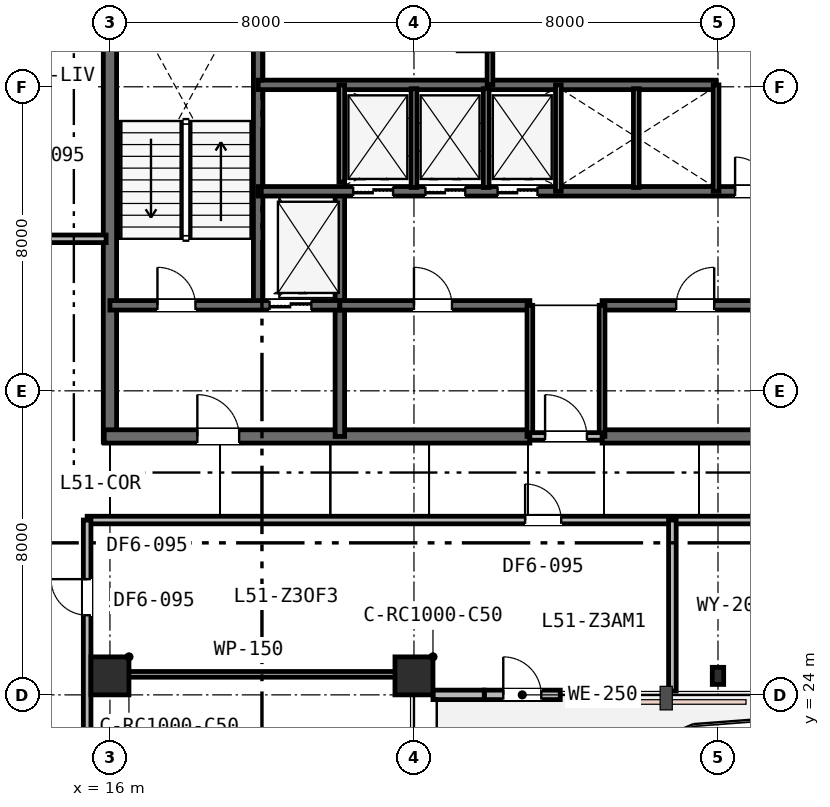
"""IFC4 building model, lengths in metres.
Left out: names, types, materials, properties, quantities, classifications, styles, units other than length and angle.
Written with IfcOpenShell. Run it as: python <this file> out.ifc"""

import sys

from ifc_helpers import new_model, si_unit, direction, frame, frame_2d, origin, origin_2d, place, context, subcontext, project, spatial, rectangle, i_section, extrude, element, fill, save


model = new_model("IFC4")
c1 = context("Model", 3, precision=1e-05, world=origin(), true_north=direction((0.0, 1.0)))
c2 = subcontext(c1, "Body", "Model", "MODEL_VIEW")
j1 = project(units=[si_unit("LENGTHUNIT", "METRE"), si_unit("PLANEANGLEUNIT", "RADIAN")], contexts=[c1])
p1 = place(None, origin())
s1 = spatial("IfcSite", under=j1, at=p1, CompositionType="ELEMENT")
p2 = place(p1, origin())
s2 = spatial("IfcBuilding", under=s1, at=p2, CompositionType="ELEMENT")
p3 = place(p2, frame((0.0, 0.0, 197.4)))
s3 = spatial("IfcBuildingStorey", under=s2, at=p3, CompositionType="ELEMENT", Elevation=197.4)
p4 = place(p3, frame((16.0, 30.65, 0.0), z_axis=(0.0, 0.0, 1.0), x_axis=(0.0, 1.0, 0.0)))
e1 = element("IfcWall", 1, at=p4, inside=s3, PredefinedType="SHEAR", context=c2, shape_type="SweptSolid", body=[
    extrude(rectangle(XDim=12.3, YDim=0.35, at=frame_2d((6.15, 0.0))), origin(), (0.0, 0.0, 1.0), 3.6),
])
p5 = place(p3, frame((15.85, 30.8, 0.0), z_axis=(0.0, 0.0, 1.0), x_axis=(1.0, 0.0, 0.0)))
e2 = element("IfcWall", 2, at=p5, inside=s3, PredefinedType="SHEAR", context=c2, shape_type="SweptSolid", body=[
    extrude(rectangle(XDim=11.2, YDim=0.35, at=frame_2d((5.6, 0.0))), origin(), (0.0, 0.0, 1.0), 3.6),
])
p6 = place(p5, frame((2.45, 0.0, 0.0)))
e3 = element("IfcOpeningElement", 3, at=p6, cuts=e2, PredefinedType="OPENING", context=c2, shape_type="SweptSolid", body=[
    extrude(rectangle(XDim=1.1, YDim=2.15, at=frame_2d((0.55, 1.075))), frame((0.0, 0.185, 0.0), z_axis=(0.0, -1.0, 0.0), x_axis=(1.0, 0.0, 0.0)), (0.0, 0.0, 1.0), 0.37),
])
p7 = place(p3, frame((28.95, 30.8, 0.0), z_axis=(0.0, 0.0, 1.0), x_axis=(1.0, 0.0, 0.0)))
e4 = element("IfcWall", 4, at=p7, inside=s3, PredefinedType="SHEAR", context=c2, shape_type="SweptSolid", body=[
    extrude(rectangle(XDim=11.2, YDim=0.35, at=frame_2d((5.6, 0.0))), origin(), (0.0, 0.0, 1.0), 3.6),
])
p8 = place(p7, frame((7.65, 0.0, 0.0)))
e5 = element("IfcOpeningElement", 5, at=p8, cuts=e4, PredefinedType="OPENING", context=c2, shape_type="SweptSolid", body=[
    extrude(rectangle(XDim=1.1, YDim=2.15, at=frame_2d((0.55, 1.075))), frame((0.0, 0.185, 0.0), z_axis=(0.0, -1.0, 0.0), x_axis=(1.0, 0.0, 0.0)), (0.0, 0.0, 1.0), 0.37),
])
p9 = place(p3, frame((19.9, 34.25, 0.0), z_axis=(0.0, 0.0, 1.0), x_axis=(0.0, 1.0, 0.0)))
e6 = element("IfcWall", 6, at=p9, inside=s3, PredefinedType="SHEAR", context=c2, shape_type="SweptSolid", body=[
    extrude(rectangle(XDim=8.65, YDim=0.25, at=frame_2d((4.325, 0.0))), origin(), (0.0, 0.0, 1.0), 3.6),
])
p10 = place(p3, frame((22.05, 30.8, 0.0), z_axis=(0.0, 0.0, 1.0), x_axis=(0.0, 1.0, 0.0)))
e7 = element("IfcWall", 7, at=p10, inside=s3, PredefinedType="SHEAR", context=c2, shape_type="SweptSolid", body=[
    extrude(rectangle(XDim=6.45, YDim=0.25, at=frame_2d((3.225, 0.0))), origin(), (0.0, 0.0, 1.0), 3.6),
])
p11 = place(p3, frame((16.0, 34.25, 0.0), z_axis=(0.0, 0.0, 1.0), x_axis=(1.0, 0.0, 0.0)))
e8 = element("IfcWall", 8, at=p11, inside=s3, PredefinedType="SHEAR", context=c2, shape_type="SweptSolid", body=[
    extrude(rectangle(XDim=6.05, YDim=0.25, at=frame_2d((3.025, 0.0))), origin(), (0.0, 0.0, 1.0), 3.6),
])
p12 = place(p11, frame((1.25, 0.0, 0.0)))
e9 = element("IfcOpeningElement", 9, at=p12, cuts=e8, PredefinedType="OPENING", context=c2, shape_type="SweptSolid", body=[
    extrude(rectangle(XDim=1.0, YDim=2.15, at=frame_2d((0.5, 1.075))), frame((0.0, 0.135, 0.0), z_axis=(0.0, -1.0, 0.0), x_axis=(1.0, 0.0, 0.0)), (0.0, 0.0, 1.0), 0.27),
])
p13 = place(p11, frame((4.2, 0.0, 0.0)))
e10 = element("IfcOpeningElement", 10, at=p13, cuts=e8, PredefinedType="OPENING", context=c2, shape_type="SweptSolid", body=[
    extrude(rectangle(XDim=1.1, YDim=2.15, at=frame_2d((0.55, 1.075))), frame((0.0, 0.135, 0.0), z_axis=(0.0, -1.0, 0.0), x_axis=(1.0, 0.0, 0.0)), (0.0, 0.0, 1.0), 0.27),
])
p14 = place(p3, frame((22.05, 34.25, 0.0), z_axis=(0.0, 0.0, 1.0), x_axis=(1.0, 0.0, 0.0)))
e11 = element("IfcWall", 11, at=p14, inside=s3, PredefinedType="SHEAR", context=c2, shape_type="SweptSolid", body=[
    extrude(rectangle(XDim=5.0, YDim=0.25, at=frame_2d((2.5, 0.0))), origin(), (0.0, 0.0, 1.0), 3.6),
])
p15 = place(p14, frame((1.95, 0.0, 0.0)))
e12 = element("IfcOpeningElement", 12, at=p15, cuts=e11, PredefinedType="OPENING", context=c2, shape_type="SweptSolid", body=[
    extrude(rectangle(XDim=1.0, YDim=2.15, at=frame_2d((0.5, 1.075))), frame((0.0, 0.135, 0.0), z_axis=(0.0, -1.0, 0.0), x_axis=(1.0, 0.0, 0.0)), (0.0, 0.0, 1.0), 0.27),
])
p16 = place(p3, frame((28.95, 34.25, 0.0), z_axis=(0.0, 0.0, 1.0), x_axis=(1.0, 0.0, 0.0)))
e13 = element("IfcWall", 13, at=p16, inside=s3, PredefinedType="SHEAR", context=c2, shape_type="SweptSolid", body=[
    extrude(rectangle(XDim=5.0, YDim=0.25, at=frame_2d((2.5, 0.0))), origin(), (0.0, 0.0, 1.0), 3.6),
])
p17 = place(p16, frame((1.95, 0.0, 0.0)))
e14 = element("IfcOpeningElement", 14, at=p17, cuts=e13, PredefinedType="OPENING", context=c2, shape_type="SweptSolid", body=[
    extrude(rectangle(XDim=1.0, YDim=2.15, at=frame_2d((0.5, 1.075))), frame((0.0, 0.135, 0.0), z_axis=(0.0, -1.0, 0.0), x_axis=(1.0, 0.0, 0.0)), (0.0, 0.0, 1.0), 0.27),
])
p18 = place(p3, frame((19.9, 37.25, 0.0), z_axis=(0.0, 0.0, 1.0), x_axis=(1.0, 0.0, 0.0)))
e15 = element("IfcWall", 15, at=p18, inside=s3, PredefinedType="SHEAR", context=c2, shape_type="SweptSolid", body=[
    extrude(rectangle(XDim=16.2, YDim=0.25, at=frame_2d((8.1, 0.0))), origin(), (0.0, 0.0, 1.0), 3.6),
])
p19 = place(p18, frame((12.55, 0.0, 0.0)))
e16 = element("IfcOpeningElement", 16, at=p19, cuts=e15, PredefinedType="OPENING", context=c2, shape_type="SweptSolid", body=[
    extrude(rectangle(XDim=0.9, YDim=2.15, at=frame_2d((0.45, 1.075))), frame((0.0, 0.135, 0.0), z_axis=(0.0, -1.0, 0.0), x_axis=(1.0, 0.0, 0.0)), (0.0, 0.0, 1.0), 0.27),
])
p20 = place(p18, frame((2.5, 0.0, 0.0)))
e17 = element("IfcOpeningElement", 17, at=p20, cuts=e15, PredefinedType="OPENING", context=c2, shape_type="SweptSolid", body=[
    extrude(rectangle(XDim=1.05, YDim=2.15, at=frame_2d((0.525, 1.075))), frame((0.0, 0.135, 0.0), z_axis=(0.0, -1.0, 0.0), x_axis=(1.0, 0.0, 0.0)), (0.0, 0.0, 1.0), 0.27),
])
p21 = place(p18, frame((4.4, 0.0, 0.0)))
e18 = element("IfcOpeningElement", 18, at=p21, cuts=e15, PredefinedType="OPENING", context=c2, shape_type="SweptSolid", body=[
    extrude(rectangle(XDim=1.05, YDim=2.15, at=frame_2d((0.525, 1.075))), frame((0.0, 0.135, 0.0), z_axis=(0.0, -1.0, 0.0), x_axis=(1.0, 0.0, 0.0)), (0.0, 0.0, 1.0), 0.27),
])
p22 = place(p18, frame((6.3, 0.0, 0.0)))
e19 = element("IfcOpeningElement", 19, at=p22, cuts=e15, PredefinedType="OPENING", context=c2, shape_type="SweptSolid", body=[
    extrude(rectangle(XDim=1.05, YDim=2.15, at=frame_2d((0.525, 1.075))), frame((0.0, 0.135, 0.0), z_axis=(0.0, -1.0, 0.0), x_axis=(1.0, 0.0, 0.0)), (0.0, 0.0, 1.0), 0.27),
])
p23 = place(p3, frame((19.9, 40.05, 0.0), z_axis=(0.0, 0.0, 1.0), x_axis=(1.0, 0.0, 0.0)))
e20 = element("IfcWall", 20, at=p23, inside=s3, PredefinedType="SHEAR", context=c2, shape_type="SweptSolid", body=[
    extrude(rectangle(XDim=12.05, YDim=0.25, at=frame_2d((6.025, 0.0))), origin(), (0.0, 0.0, 1.0), 3.6),
])
for number, where, z_axis, x_axis in (
    (21, (16.0, 24.5, 0.0), (0.0, 0.0, 1.0), (1.0, 0.0, 0.0)),
    (22, (24.0, 24.5, 0.0), (0.0, 0.0, 1.0), (1.0, 0.0, 0.0)),
):
    element("IfcColumn", number, at=place(p3, frame(where, z_axis=z_axis, x_axis=x_axis)), inside=s3, PredefinedType="COLUMN", context=c2, shape_type="SweptSolid", body=[
        extrude(rectangle(XDim=1.0, YDim=1.0, at=origin_2d()), origin(), (0.0, 0.0, 1.0), 3.6),
    ])
p24 = place(p3, frame((32.0, 24.5, 0.0), z_axis=(0.0, 0.0, 1.0), x_axis=(1.0, 0.0, 0.0)))
e23 = element("IfcColumn", 23, at=p24, inside=s3, PredefinedType="COLUMN", context=c2, shape_type="SweptSolid", body=[
    extrude(i_section(OverallWidth=0.3, OverallDepth=0.45, WebThickness=0.014, FlangeThickness=0.026, FilletRadius=0.027, at=origin_2d()), origin(), (0.0, 0.0, 1.0), 3.6),
])
p25 = place(p3, frame((25.85, 24.0, 0.0), z_axis=(0.0, 0.0, 1.0), x_axis=(1.0, 0.0, 0.0)))
e24 = element("IfcWall", 24, at=p25, inside=s3, PredefinedType="STANDARD", context=c2, shape_type="SweptSolid", body=[
    extrude(rectangle(XDim=2.0, YDim=0.25, at=frame_2d((1.0, 0.0))), origin(), (0.0, 0.0, 1.0), 3.02),
])
p26 = place(p25, frame((0.5, 0.0, 0.0)))
e25 = element("IfcOpeningElement", 25, at=p26, cuts=e24, PredefinedType="OPENING", context=c2, shape_type="SweptSolid", body=[
    extrude(rectangle(XDim=1.0, YDim=2.15, at=frame_2d((0.5, 1.075))), frame((0.0, 0.135, 0.0), z_axis=(0.0, -1.0, 0.0), x_axis=(1.0, 0.0, 0.0)), (0.0, 0.0, 1.0), 0.27),
])
p27 = place(p3, frame((24.5, 24.0, 0.0), z_axis=(0.0, 0.0, 1.0), x_axis=(1.0, 0.0, 0.0)))
e26 = element("IfcWall", 26, at=p27, inside=s3, PredefinedType="STANDARD", context=c2, shape_type="SweptSolid", body=[
    extrude(rectangle(XDim=1.35, YDim=0.25, at=frame_2d((0.675, 0.0))), origin(), (0.0, 0.0, 1.0), 3.02),
])
for number, where, z_axis, x_axis in (
    (27, (27.05, 30.8, 0.0), (0.0, 0.0, 1.0), (0.0, 1.0, 0.0)),
    (28, (28.95, 30.8, 0.0), (0.0, 0.0, 1.0), (0.0, 1.0, 0.0)),
):
    element("IfcWall", number, at=place(p3, frame(where, z_axis=z_axis, x_axis=x_axis)), inside=s3, PredefinedType="PLUMBINGWALL", context=c2, shape_type="SweptSolid", body=[
        extrude(rectangle(XDim=3.45, YDim=0.15, at=frame_2d((1.725, 0.0))), origin(), (0.0, 0.0, 1.0), 3.07),
    ])
p28 = place(p3, frame((27.05, 30.8, 0.0), z_axis=(0.0, 0.0, 1.0), x_axis=(1.0, 0.0, 0.0)))
e29 = element("IfcWall", 29, at=p28, inside=s3, PredefinedType="PARTITIONING", context=c2, shape_type="SweptSolid", body=[
    extrude(rectangle(XDim=1.9, YDim=0.2, at=frame_2d((0.95, 0.0))), origin(), (0.0, 0.0, 1.0), 3.07),
])
p29 = place(p28, frame((0.4, 0.0, 0.0)))
e30 = element("IfcOpeningElement", 30, at=p29, cuts=e29, PredefinedType="OPENING", context=c2, shape_type="SweptSolid", body=[
    extrude(rectangle(XDim=1.1, YDim=2.15, at=frame_2d((0.55, 1.075))), frame((0.0, 0.11, 0.0), z_axis=(0.0, -1.0, 0.0), x_axis=(1.0, 0.0, 0.0)), (0.0, 0.0, 1.0), 0.22),
])
p30 = place(p3, frame((22.1, 37.49, 0.0), z_axis=(0.0, 0.0, 1.0), x_axis=(0.0, 1.0, 0.0)))
e31 = element("IfcWall", 31, at=p30, inside=s3, PredefinedType="PLUMBINGWALL", context=c2, shape_type="SweptSolid", body=[
    extrude(rectangle(XDim=2.56, YDim=0.15, at=frame_2d((1.28, 0.0))), origin(), (0.0, 0.0, 1.0), 3.33),
])
p31 = place(p3, frame((27.8, 37.25, 0.0), z_axis=(0.0, 0.0, 1.0), x_axis=(0.0, 1.0, 0.0)))
e32 = element("IfcWall", 32, at=p31, inside=s3, PredefinedType="PLUMBINGWALL", context=c2, shape_type="SweptSolid", body=[
    extrude(rectangle(XDim=2.8, YDim=0.15, at=frame_2d((1.4, 0.0))), origin(), (0.0, 0.0, 1.0), 3.33),
])
for number, where, z_axis, x_axis in (
    (33, (24.0, 37.35, 0.0), (0.0, 0.0, 1.0), (0.0, 1.0, 0.0)),
    (34, (25.9, 37.35, 0.0), (0.0, 0.0, 1.0), (0.0, 1.0, 0.0)),
):
    element("IfcWall", number, at=place(p3, frame(where, z_axis=z_axis, x_axis=x_axis)), inside=s3, PredefinedType="PLUMBINGWALL", context=c2, shape_type="SweptSolid", body=[
        extrude(rectangle(XDim=2.6, YDim=0.15, at=frame_2d((1.3, 0.0))), origin(), (0.0, 0.0, 1.0), 3.33),
    ])
p32 = place(p3, frame((31.95, 37.25, 0.0), z_axis=(0.0, 0.0, 1.0), x_axis=(0.0, 1.0, 0.0)))
e35 = element("IfcWall", 35, at=p32, inside=s3, PredefinedType="PLUMBINGWALL", context=c2, shape_type="SweptSolid", body=[
    extrude(rectangle(XDim=2.8, YDim=0.15, at=frame_2d((1.4, 0.0))), origin(), (0.0, 0.0, 1.0), 3.33),
])
p33 = place(p3, frame((29.85, 37.35, 0.0), z_axis=(0.0, 0.0, 1.0), x_axis=(0.0, 1.0, 0.0)))
e36 = element("IfcWall", 36, at=p33, inside=s3, PredefinedType="PLUMBINGWALL", context=c2, shape_type="SweptSolid", body=[
    extrude(rectangle(XDim=2.6, YDim=0.15, at=frame_2d((1.3, 0.0))), origin(), (0.0, 0.0, 1.0), 3.33),
])
p34 = place(p3, frame((26.0, 40.05, 0.0), z_axis=(0.0, 0.0, 1.0), x_axis=(0.0, 1.0, 0.0)))
e37 = element("IfcWall", 37, at=p34, inside=s3, PredefinedType="PARTITIONING", context=c2, shape_type="SweptSolid", body=[
    extrude(rectangle(XDim=2.85, YDim=0.15, at=frame_2d((1.425, 0.0))), origin(), (0.0, 0.0, 1.0), 3.33),
])
p35 = place(p34, frame((0.865, 0.0, 0.0)))
e38 = element("IfcOpeningElement", 38, at=p35, cuts=e37, PredefinedType="OPENING", context=c2, shape_type="SweptSolid", body=[
    extrude(rectangle(XDim=0.9, YDim=2.15, at=frame_2d((0.45, 1.075))), frame((0.0, 0.085, 0.0), z_axis=(0.0, -1.0, 0.0), x_axis=(1.0, 0.0, 0.0)), (0.0, 0.0, 1.0), 0.17),
])
p36 = place(p3, frame((15.4, 28.6, 0.0), z_axis=(0.0, 0.0, 1.0), x_axis=(1.0, 0.0, 0.0)))
e39 = element("IfcWall", 39, at=p36, inside=s3, PredefinedType="PARTITIONING", context=c2, shape_type="SweptSolid", body=[
    extrude(rectangle(XDim=35.5, YDim=0.2, at=frame_2d((17.75, 0.0))), origin(), (0.0, 0.0, 1.0), 2.92),
])
p37 = place(p36, frame((11.525, 0.0, 0.0)))
e40 = element("IfcOpeningElement", 40, at=p37, cuts=e39, PredefinedType="OPENING", context=c2, shape_type="SweptSolid", body=[
    extrude(rectangle(XDim=0.95, YDim=2.15, at=frame_2d((0.475, 1.075))), frame((0.0, 0.11, 0.0), z_axis=(0.0, -1.0, 0.0), x_axis=(1.0, 0.0, 0.0)), (0.0, 0.0, 1.0), 0.22),
])
p38 = place(p36, frame((19.425, 0.0, 0.0)))
e41 = element("IfcOpeningElement", 41, at=p38, cuts=e39, PredefinedType="OPENING", context=c2, shape_type="SweptSolid", body=[
    extrude(rectangle(XDim=0.95, YDim=2.15, at=frame_2d((0.475, 1.075))), frame((0.0, 0.11, 0.0), z_axis=(0.0, -1.0, 0.0), x_axis=(1.0, 0.0, 0.0)), (0.0, 0.0, 1.0), 0.22),
])
p39 = place(p36, frame((26.275, 0.0, 0.0)))
e42 = element("IfcOpeningElement", 42, at=p39, cuts=e39, PredefinedType="OPENING", context=c2, shape_type="SweptSolid", body=[
    extrude(rectangle(XDim=0.95, YDim=2.15, at=frame_2d((0.475, 1.075))), frame((0.0, 0.11, 0.0), z_axis=(0.0, -1.0, 0.0), x_axis=(1.0, 0.0, 0.0)), (0.0, 0.0, 1.0), 0.22),
])
p40 = place(p3, frame((5.1, 36.0, 0.0), z_axis=(0.0, 0.0, 1.0), x_axis=(1.0, 0.0, 0.0)))
e43 = element("IfcWall", 43, at=p40, inside=s3, PredefinedType="PARTITIONING", context=c2, shape_type="SweptSolid", body=[
    extrude(rectangle(XDim=10.8, YDim=0.2, at=frame_2d((5.4, 0.0))), origin(), (0.0, 0.0, 1.0), 3.02),
])
p41 = place(p40, frame((6.975, 0.0, 0.0)))
e44 = element("IfcOpeningElement", 44, at=p41, cuts=e43, PredefinedType="OPENING", context=c2, shape_type="SweptSolid", body=[
    extrude(rectangle(XDim=0.95, YDim=2.15, at=frame_2d((0.475, 1.075))), frame((0.0, 0.11, 0.0), z_axis=(0.0, -1.0, 0.0), x_axis=(1.0, 0.0, 0.0)), (0.0, 0.0, 1.0), 0.22),
])
p42 = place(p3, frame((30.8, 24.1, 0.0), z_axis=(0.0, 0.0, 1.0), x_axis=(0.0, 1.0, 0.0)))
e45 = element("IfcWall", 45, at=p42, inside=s3, PredefinedType="PARTITIONING", context=c2, shape_type="SweptSolid", body=[
    extrude(rectangle(XDim=4.5, YDim=0.2, at=frame_2d((2.25, 0.0))), origin(), (0.0, 0.0, 1.0), 3.02),
])
p43 = place(p3, frame((15.4, 24.54, 0.0), z_axis=(0.0, 0.0, 1.0), x_axis=(1.0, 0.0, 0.0)))
e46 = element("IfcWall", 46, at=p43, inside=s3, PredefinedType="PARTITIONING", context=c2, shape_type="SweptSolid", body=[
    extrude(rectangle(XDim=8.5, YDim=0.15, at=frame_2d((4.25, 0.0))), origin(), (0.0, 0.0, 1.0), 2.92),
])
p44 = place(p3, frame((15.4, 17.0, 0.0), z_axis=(0.0, 0.0, 1.0), x_axis=(0.0, 1.0, 0.0)))
e47 = element("IfcWall", 47, at=p44, inside=s3, PredefinedType="PARTITIONING", context=c2, shape_type="SweptSolid", body=[
    extrude(rectangle(XDim=11.6, YDim=0.2, at=frame_2d((5.8, 0.0))), origin(), (0.0, 0.0, 1.0), 2.92),
])
p45 = place(p44, frame((9.095, 0.0, 0.0)))
e48 = element("IfcOpeningElement", 48, at=p45, cuts=e47, PredefinedType="OPENING", context=c2, shape_type="SweptSolid", body=[
    extrude(rectangle(XDim=0.95, YDim=2.15, at=frame_2d((0.475, 1.075))), frame((0.0, 0.11, 0.0), z_axis=(0.0, -1.0, 0.0), x_axis=(1.0, 0.0, 0.0)), (0.0, 0.0, 1.0), 0.22),
])
p46 = place(p44, frame((3.295, 0.0, 0.0)))
e49 = element("IfcOpeningElement", 49, at=p46, cuts=e47, PredefinedType="OPENING", context=c2, shape_type="SweptSolid", body=[
    extrude(rectangle(XDim=0.95, YDim=2.15, at=frame_2d((0.475, 1.075))), frame((0.0, 0.11, 0.0), z_axis=(0.0, -1.0, 0.0), x_axis=(1.0, 0.0, 0.0)), (0.0, 0.0, 1.0), 0.22),
])
p47 = place(p26, origin())
e50 = element("IfcDoor", 50, at=p47, inside=s3, OperationType="SINGLE_SWING_LEFT", PredefinedType="DOOR", context=c2, shape_type="SweptSolid", body=[
    extrude(rectangle(XDim=1.0, YDim=2.15, at=frame_2d((0.5, 1.075))), frame((0.0, 0.025, 0.0), z_axis=(0.0, -1.0, 0.0), x_axis=(1.0, 0.0, 0.0)), (0.0, 0.0, 1.0), 0.05),
])
fill(e25, e50)
p48 = place(p29, origin())
e51 = element("IfcDoor", 51, at=p48, inside=s3, OperationType="SINGLE_SWING_LEFT", PredefinedType="DOOR", context=c2, shape_type="SweptSolid", body=[
    extrude(rectangle(XDim=1.1, YDim=2.15, at=frame_2d((0.55, 1.075))), frame((0.0, 0.025, 0.0), z_axis=(0.0, -1.0, 0.0), x_axis=(1.0, 0.0, 0.0)), (0.0, 0.0, 1.0), 0.05),
])
fill(e30, e51)
p49 = place(p12, origin())
e52 = element("IfcDoor", 52, at=p49, inside=s3, OperationType="SINGLE_SWING_LEFT", PredefinedType="DOOR", context=c2, shape_type="SweptSolid", body=[
    extrude(rectangle(XDim=1.0, YDim=2.15, at=frame_2d((0.5, 1.075))), frame((0.0, 0.025, 0.0), z_axis=(0.0, -1.0, 0.0), x_axis=(1.0, 0.0, 0.0)), (0.0, 0.0, 1.0), 0.05),
])
fill(e9, e52)
p50 = place(p6, origin())
e53 = element("IfcDoor", 53, at=p50, inside=s3, OperationType="SINGLE_SWING_LEFT", PredefinedType="DOOR", context=c2, shape_type="SweptSolid", body=[
    extrude(rectangle(XDim=1.1, YDim=2.15, at=frame_2d((0.55, 1.075))), frame((0.0, 0.025, 0.0), z_axis=(0.0, -1.0, 0.0), x_axis=(1.0, 0.0, 0.0)), (0.0, 0.0, 1.0), 0.05),
])
fill(e3, e53)
p51 = place(p15, origin())
e54 = element("IfcDoor", 54, at=p51, inside=s3, OperationType="SINGLE_SWING_LEFT", PredefinedType="DOOR", context=c2, shape_type="SweptSolid", body=[
    extrude(rectangle(XDim=1.0, YDim=2.15, at=frame_2d((0.5, 1.075))), frame((0.0, 0.025, 0.0), z_axis=(0.0, -1.0, 0.0), x_axis=(1.0, 0.0, 0.0)), (0.0, 0.0, 1.0), 0.05),
])
fill(e12, e54)
p52 = place(p17, origin())
e55 = element("IfcDoor", 55, at=p52, inside=s3, OperationType="SINGLE_SWING_RIGHT", PredefinedType="DOOR", context=c2, shape_type="SweptSolid", body=[
    extrude(rectangle(XDim=1.0, YDim=2.15, at=frame_2d((0.5, 1.075))), frame((0.0, 0.025, 0.0), z_axis=(0.0, -1.0, 0.0), x_axis=(1.0, 0.0, 0.0)), (0.0, 0.0, 1.0), 0.05),
])
fill(e14, e55)
p53 = place(p19, origin())
e56 = element("IfcDoor", 56, at=p53, inside=s3, OperationType="SINGLE_SWING_LEFT", PredefinedType="DOOR", context=c2, shape_type="SweptSolid", body=[
    extrude(rectangle(XDim=0.9, YDim=2.15, at=frame_2d((0.45, 1.075))), frame((0.0, 0.025, 0.0), z_axis=(0.0, -1.0, 0.0), x_axis=(1.0, 0.0, 0.0)), (0.0, 0.0, 1.0), 0.05),
])
fill(e16, e56)
p54 = place(p37, origin())
e57 = element("IfcDoor", 57, at=p54, inside=s3, OperationType="SINGLE_SWING_LEFT", PredefinedType="DOOR", context=c2, shape_type="SweptSolid", body=[
    extrude(rectangle(XDim=0.95, YDim=2.15, at=frame_2d((0.475, 1.075))), frame((0.0, 0.025, 0.0), z_axis=(0.0, -1.0, 0.0), x_axis=(1.0, 0.0, 0.0)), (0.0, 0.0, 1.0), 0.05),
])
fill(e40, e57)
p55 = place(p45, origin())
e58 = element("IfcDoor", 58, at=p55, inside=s3, OperationType="SINGLE_SWING_RIGHT", PredefinedType="DOOR", context=c2, shape_type="SweptSolid", body=[
    extrude(rectangle(XDim=0.95, YDim=2.15, at=frame_2d((0.475, 1.075))), frame((0.0, 0.025, 0.0), z_axis=(0.0, -1.0, 0.0), x_axis=(1.0, 0.0, 0.0)), (0.0, 0.0, 1.0), 0.05),
])
fill(e48, e58)
p56 = place(p13, origin())
e59 = element("IfcDoor", 59, at=p56, inside=s3, OperationType="DOUBLE_DOOR_SLIDING", PredefinedType="DOOR", context=c2, shape_type="SweptSolid", body=[
    extrude(rectangle(XDim=1.1, YDim=2.15, at=frame_2d((0.55, 1.075))), frame((0.0, 0.025, 0.0), z_axis=(0.0, -1.0, 0.0), x_axis=(1.0, 0.0, 0.0)), (0.0, 0.0, 1.0), 0.05),
])
fill(e10, e59)
p57 = place(p20, origin())
e60 = element("IfcDoor", 60, at=p57, inside=s3, OperationType="DOUBLE_DOOR_SLIDING", PredefinedType="DOOR", context=c2, shape_type="SweptSolid", body=[
    extrude(rectangle(XDim=1.05, YDim=2.15, at=frame_2d((0.525, 1.075))), frame((0.0, 0.025, 0.0), z_axis=(0.0, -1.0, 0.0), x_axis=(1.0, 0.0, 0.0)), (0.0, 0.0, 1.0), 0.05),
])
fill(e17, e60)
p58 = place(p21, origin())
e61 = element("IfcDoor", 61, at=p58, inside=s3, OperationType="DOUBLE_DOOR_SLIDING", PredefinedType="DOOR", context=c2, shape_type="SweptSolid", body=[
    extrude(rectangle(XDim=1.05, YDim=2.15, at=frame_2d((0.525, 1.075))), frame((0.0, 0.025, 0.0), z_axis=(0.0, -1.0, 0.0), x_axis=(1.0, 0.0, 0.0)), (0.0, 0.0, 1.0), 0.05),
])
fill(e18, e61)
p59 = place(p22, origin())
e62 = element("IfcDoor", 62, at=p59, inside=s3, OperationType="DOUBLE_DOOR_SLIDING", PredefinedType="DOOR", context=c2, shape_type="SweptSolid", body=[
    extrude(rectangle(XDim=1.05, YDim=2.15, at=frame_2d((0.525, 1.075))), frame((0.0, 0.025, 0.0), z_axis=(0.0, -1.0, 0.0), x_axis=(1.0, 0.0, 0.0)), (0.0, 0.0, 1.0), 0.05),
])
fill(e19, e62)
save(model, sys.argv[1])
